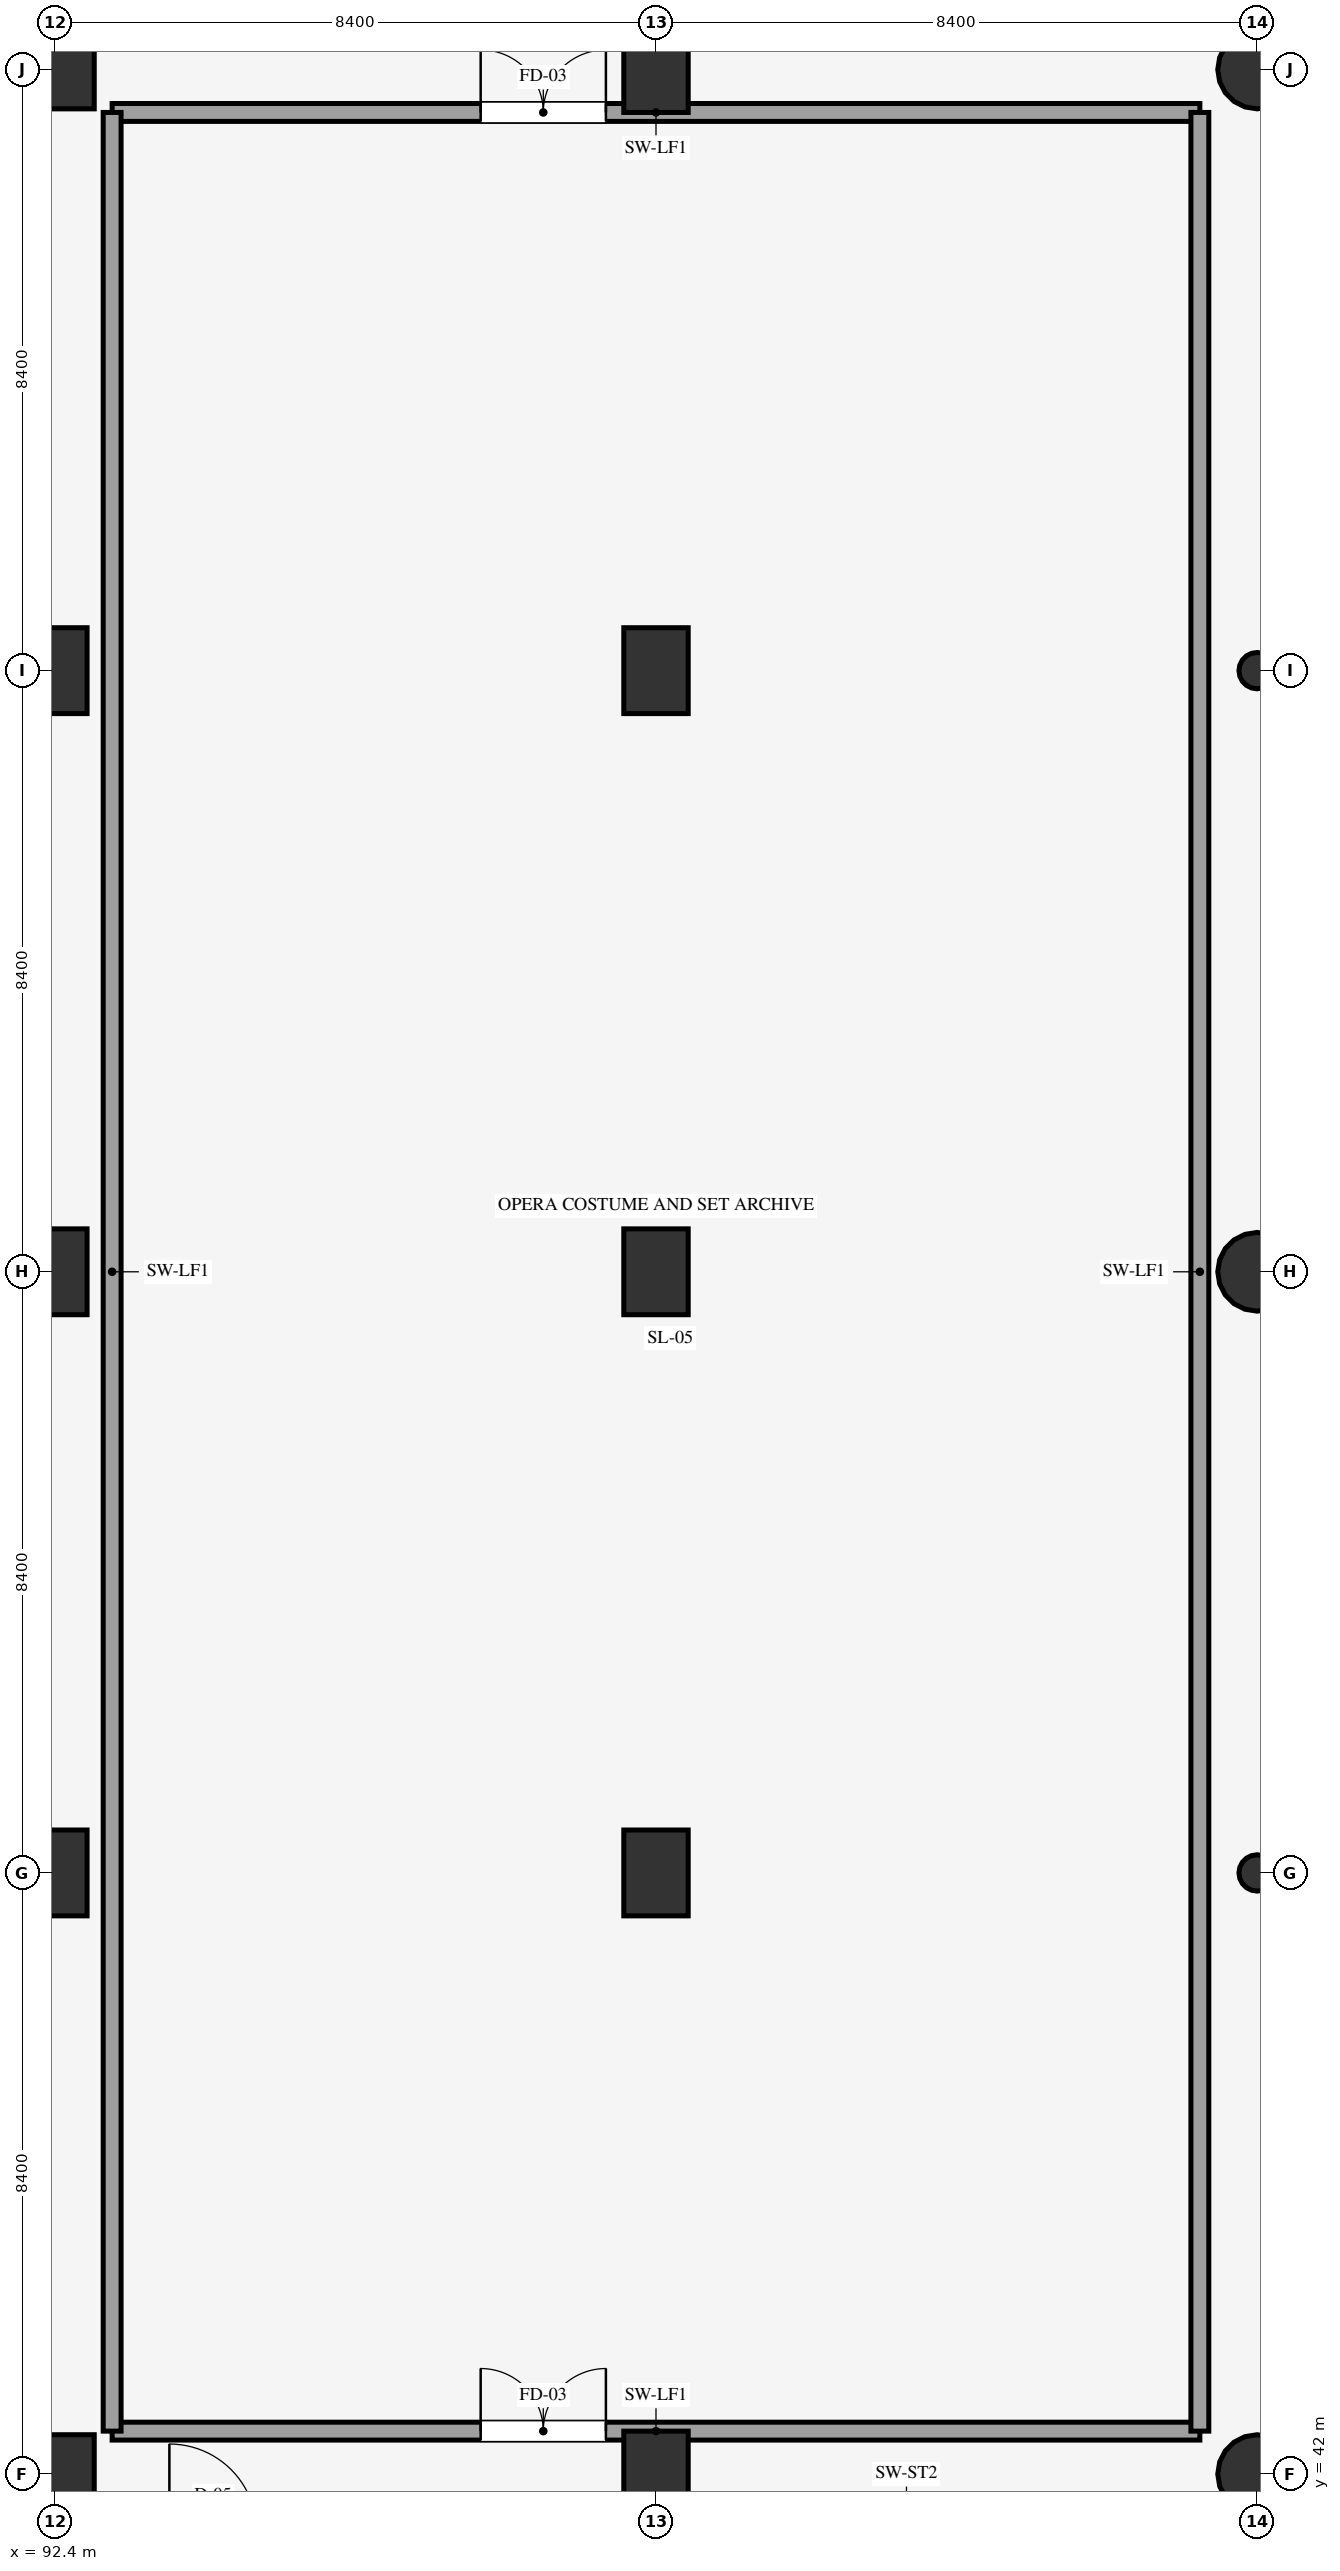
"""IFC4 building model, lengths in metres.
Left out: names, types, materials, properties, quantities, classifications, styles, units other than length and angle.
Written with IfcOpenShell. Run it as: python <this file> out.ifc"""

import sys

from ifc_helpers import new_model, si_unit, direction, frame, frame_2d, origin, origin_2d, place, context, subcontext, project, spatial, rectangle, circle, hollow_circle, extrude, element, fill, save


model = new_model("IFC4")
c1 = context("Model", 3, precision=1e-05, world=origin(), true_north=direction((0.0, 1.0)))
c2 = subcontext(c1, "Body", "Model", "MODEL_VIEW")
j1 = project(units=[si_unit("LENGTHUNIT", "METRE"), si_unit("PLANEANGLEUNIT", "RADIAN")], contexts=[c1])
p1 = place(None, origin())
s1 = spatial("IfcSite", under=j1, at=p1, CompositionType="ELEMENT")
p2 = place(p1, origin())
s2 = spatial("IfcBuilding", under=s1, at=p2, CompositionType="ELEMENT")
p3 = place(p2, frame((0.0, 0.0, 23.4)))
s3 = spatial("IfcBuildingStorey", under=s2, at=p3, CompositionType="ELEMENT", Elevation=23.4)
p4 = place(p3, frame((92.4, 42.0, 0.0), z_axis=(0.0, 0.0, 1.0), x_axis=(1.0, 0.0, 0.0)))
e1 = element("IfcColumn", 1, at=p4, inside=s3, PredefinedType="COLUMN", context=c2, shape_type="SweptSolid", body=[
    extrude(rectangle(XDim=1.1, YDim=1.1, at=origin_2d()), origin(), (0.0, 0.0, 1.0), 4.5),
])
for number, where, z_axis, x_axis in (
    (2, (92.4, 50.4, 0.0), (0.0, 0.0, 1.0), (1.0, 0.0, 0.0)),
    (3, (92.4, 58.8, 0.0), (0.0, 0.0, 1.0), (1.0, 0.0, 0.0)),
    (4, (92.4, 67.2, 0.0), (0.0, 0.0, 1.0), (1.0, 0.0, 0.0)),
):
    element("IfcColumn", number, at=place(p3, frame(where, z_axis=z_axis, x_axis=x_axis)), inside=s3, PredefinedType="COLUMN", context=c2, shape_type="SweptSolid", body=[
        extrude(rectangle(XDim=0.9, YDim=1.2, at=origin_2d()), origin(), (0.0, 0.0, 1.0), 4.5),
    ])
p5 = place(p3, frame((92.4, 75.6, 0.0), z_axis=(0.0, 0.0, 1.0), x_axis=(1.0, 0.0, 0.0)))
e5 = element("IfcColumn", 5, at=p5, inside=s3, PredefinedType="COLUMN", context=c2, shape_type="SweptSolid", body=[
    extrude(rectangle(XDim=1.1, YDim=1.1, at=origin_2d()), origin(), (0.0, 0.0, 1.0), 4.5),
])
for number, where, z_axis, x_axis in (
    (6, (100.8, 42.0, 0.0), (0.0, 0.0, 1.0), (1.0, 0.0, 0.0)),
    (7, (100.8, 50.4, 0.0), (0.0, 0.0, 1.0), (1.0, 0.0, 0.0)),
    (8, (100.8, 58.8, 0.0), (0.0, 0.0, 1.0), (1.0, 0.0, 0.0)),
    (9, (100.8, 67.2, 0.0), (0.0, 0.0, 1.0), (1.0, 0.0, 0.0)),
    (10, (100.8, 75.6, 0.0), (0.0, 0.0, 1.0), (1.0, 0.0, 0.0)),
):
    element("IfcColumn", number, at=place(p3, frame(where, z_axis=z_axis, x_axis=x_axis)), inside=s3, PredefinedType="COLUMN", context=c2, shape_type="SweptSolid", body=[
        extrude(rectangle(XDim=0.9, YDim=1.2, at=origin_2d()), origin(), (0.0, 0.0, 1.0), 4.5),
    ])
p6 = place(p3, frame((109.2, 42.0, 0.0), z_axis=(0.0, 0.0, 1.0), x_axis=(1.0, 0.0, 0.0)))
e11 = element("IfcColumn", 11, at=p6, inside=s3, PredefinedType="COLUMN", context=c2, shape_type="SweptSolid", body=[
    extrude(circle(Radius=0.55, at=origin_2d()), origin(), (0.0, 0.0, 1.0), 4.5),
])
p7 = place(p3, frame((109.2, 50.4, 0.0), z_axis=(0.0, 0.0, 1.0), x_axis=(1.0, 0.0, 0.0)))
e12 = element("IfcColumn", 12, at=p7, inside=s3, PredefinedType="COLUMN", context=c2, shape_type="SweptSolid", body=[
    extrude(hollow_circle(Radius=0.254, WallThickness=0.02, at=origin_2d()), origin(), (0.0, 0.0, 1.0), 4.5),
])
p8 = place(p3, frame((109.2, 58.8, 0.0), z_axis=(0.0, 0.0, 1.0), x_axis=(1.0, 0.0, 0.0)))
e13 = element("IfcColumn", 13, at=p8, inside=s3, PredefinedType="COLUMN", context=c2, shape_type="SweptSolid", body=[
    extrude(circle(Radius=0.55, at=origin_2d()), origin(), (0.0, 0.0, 1.0), 4.5),
])
p9 = place(p3, frame((109.2, 67.2, 0.0), z_axis=(0.0, 0.0, 1.0), x_axis=(1.0, 0.0, 0.0)))
e14 = element("IfcColumn", 14, at=p9, inside=s3, PredefinedType="COLUMN", context=c2, shape_type="SweptSolid", body=[
    extrude(hollow_circle(Radius=0.254, WallThickness=0.02, at=origin_2d()), origin(), (0.0, 0.0, 1.0), 4.5),
])
p10 = place(p3, frame((109.2, 75.6, 0.0), z_axis=(0.0, 0.0, 1.0), x_axis=(1.0, 0.0, 0.0)))
e15 = element("IfcColumn", 15, at=p10, inside=s3, PredefinedType="COLUMN", context=c2, shape_type="SweptSolid", body=[
    extrude(circle(Radius=0.55, at=origin_2d()), origin(), (0.0, 0.0, 1.0), 4.5),
])
p11 = place(p3, frame((93.2, 42.6, 0.0), z_axis=(0.0, 0.0, 1.0), x_axis=(1.0, 0.0, 0.0)))
e16 = element("IfcWall", 16, at=p11, inside=s3, PredefinedType="SHEAR", context=c2, shape_type="SweptSolid", body=[
    extrude(rectangle(XDim=15.2, YDim=0.25, at=frame_2d((7.6, 0.0))), origin(), (0.0, 0.0, 1.0), 4.26),
])
p12 = place(p11, frame((5.15, 0.0, 0.0)))
e17 = element("IfcOpeningElement", 17, at=p12, cuts=e16, PredefinedType="OPENING", context=c2, shape_type="SweptSolid", body=[
    extrude(rectangle(XDim=1.75, YDim=2.2, at=frame_2d((0.875, 1.1))), frame((0.0, 0.135, 0.0), z_axis=(0.0, -1.0, 0.0), x_axis=(1.0, 0.0, 0.0)), (0.0, 0.0, 1.0), 0.27),
])
p13 = place(p3, frame((93.2, 75.0, 0.0), z_axis=(0.0, 0.0, 1.0), x_axis=(1.0, 0.0, 0.0)))
e18 = element("IfcWall", 18, at=p13, inside=s3, PredefinedType="SHEAR", context=c2, shape_type="SweptSolid", body=[
    extrude(rectangle(XDim=15.2, YDim=0.25, at=frame_2d((7.6, 0.0))), origin(), (0.0, 0.0, 1.0), 4.26),
])
p14 = place(p13, frame((5.15, 0.0, 0.0)))
e19 = element("IfcOpeningElement", 19, at=p14, cuts=e18, PredefinedType="OPENING", context=c2, shape_type="SweptSolid", body=[
    extrude(rectangle(XDim=1.75, YDim=2.2, at=frame_2d((0.875, 1.1))), frame((0.0, 0.135, 0.0), z_axis=(0.0, -1.0, 0.0), x_axis=(1.0, 0.0, 0.0)), (0.0, 0.0, 1.0), 0.27),
])
for number, where, z_axis, x_axis in (
    (20, (93.2, 42.6, 0.0), (0.0, 0.0, 1.0), (0.0, 1.0, 0.0)),
    (21, (108.4, 42.6, 0.0), (0.0, 0.0, 1.0), (0.0, 1.0, 0.0)),
):
    element("IfcWall", number, at=place(p3, frame(where, z_axis=z_axis, x_axis=x_axis)), inside=s3, PredefinedType="SHEAR", context=c2, shape_type="SweptSolid", body=[
        extrude(rectangle(XDim=32.4, YDim=0.25, at=frame_2d((16.2, 0.0))), origin(), (0.0, 0.0, 1.0), 4.26),
    ])
p15 = place(p12, origin())
e22 = element("IfcDoor", 22, at=p15, inside=s3, OperationType="DOUBLE_DOOR_SINGLE_SWING", PredefinedType="DOOR", context=c2, shape_type="SweptSolid", body=[
    extrude(rectangle(XDim=1.75, YDim=2.2, at=frame_2d((0.875, 1.1))), frame((0.0, 0.025, 0.0), z_axis=(0.0, -1.0, 0.0), x_axis=(1.0, 0.0, 0.0)), (0.0, 0.0, 1.0), 0.05),
])
fill(e17, e22)
p16 = place(p14, origin())
e23 = element("IfcDoor", 23, at=p16, inside=s3, OperationType="DOUBLE_DOOR_SINGLE_SWING", PredefinedType="DOOR", context=c2, shape_type="SweptSolid", body=[
    extrude(rectangle(XDim=1.75, YDim=2.2, at=frame_2d((0.875, 1.1))), frame((0.0, 0.025, 0.0), z_axis=(0.0, -1.0, 0.0), x_axis=(1.0, 0.0, 0.0)), (0.0, 0.0, 1.0), 0.05),
])
fill(e19, e23)
save(model, sys.argv[1])
